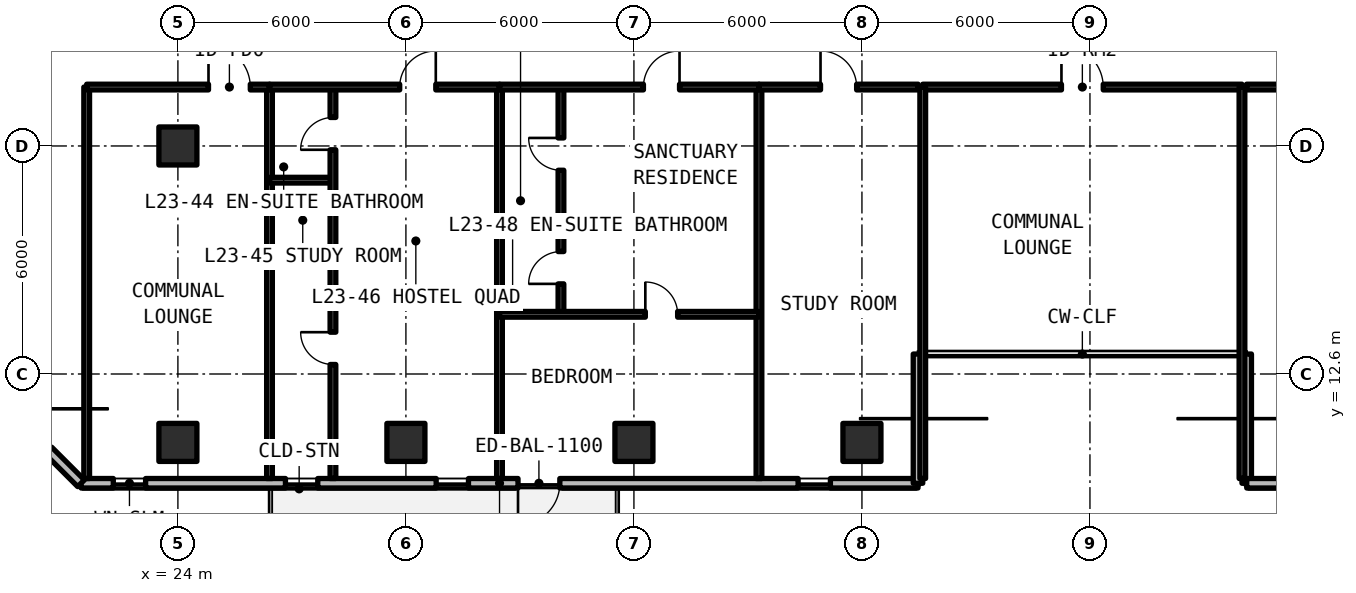
"""IFC4 building model, lengths in metres.
Left out: names, types, materials, properties, quantities, classifications, styles, units other than length and angle.
Written with IfcOpenShell. Run it as: python <this file> out.ifc"""

import sys

from ifc_helpers import new_model, si_unit, direction, frame, frame_2d, origin, origin_2d, place, context, subcontext, project, spatial, rectangle, extrude, element, fill, save


model = new_model("IFC4")
c1 = context("Model", 3, precision=1e-05, world=origin(), true_north=direction((0.0, 1.0)))
c2 = subcontext(c1, "Body", "Model", "MODEL_VIEW")
j1 = project(units=[si_unit("LENGTHUNIT", "METRE"), si_unit("PLANEANGLEUNIT", "RADIAN")], contexts=[c1])
p1 = place(None, origin())
s1 = spatial("IfcSite", under=j1, at=p1, CompositionType="ELEMENT")
p2 = place(p1, origin())
s2 = spatial("IfcBuilding", under=s1, at=p2, CompositionType="ELEMENT")
p3 = place(p2, frame((0.0, 0.0, 85.47)))
s3 = spatial("IfcBuildingStorey", under=s2, at=p3, CompositionType="ELEMENT", Elevation=85.47)
for number, where, z_axis, x_axis in (
    (1, (24.0, 18.6, 0.0), (0.0, 0.0, 1.0), (1.0, 0.0, 0.0)),
    (2, (24.0, 10.8, 0.0), (0.0, 0.0, 1.0), (1.0, 0.0, 0.0)),
    (3, (30.0, 10.8, 0.0), (0.0, 0.0, 1.0), (1.0, 0.0, 0.0)),
    (4, (36.0, 10.8, 0.0), (0.0, 0.0, 1.0), (1.0, 0.0, 0.0)),
    (5, (42.0, 10.8, 0.0), (0.0, 0.0, 1.0), (1.0, 0.0, 0.0)),
):
    element("IfcColumn", number, at=place(p3, frame(where, z_axis=z_axis, x_axis=x_axis)), inside=s3, PredefinedType="COLUMN", context=c2, shape_type="SweptSolid", body=[
        extrude(rectangle(XDim=1.0, YDim=1.0, at=origin_2d()), origin(), (0.0, 0.0, 1.0), 3.3),
    ])
p4 = place(p3, frame((21.452, 9.725, 0.0), z_axis=(0.0, 0.0, 1.0), x_axis=(1.0, 0.0, 0.0)))
e6 = element("IfcWall", 6, at=p4, inside=s3, PredefinedType="SOLIDWALL", context=c2, shape_type="SweptSolid", body=[
    extrude(rectangle(XDim=22.023, YDim=0.25, at=frame_2d((11.012, 0.0))), origin(), (0.0, 0.0, 1.0), 3.08),
])
p5 = place(p4, frame((11.498, 0.0, 0.0)))
e7 = element("IfcOpeningElement", 7, at=p5, cuts=e6, PredefinedType="OPENING", context=c2, shape_type="SweptSolid", body=[
    extrude(rectangle(XDim=1.1, YDim=2.15, at=frame_2d((0.55, 1.075))), frame((0.0, 0.135, 0.0), z_axis=(0.0, -1.0, 0.0), x_axis=(1.0, 0.0, 0.0)), (0.0, 0.0, 1.0), 0.27),
])
p6 = place(p4, frame((0.848, 0.0, 0.78)))
e8 = element("IfcOpeningElement", 8, at=p6, cuts=e6, PredefinedType="OPENING", context=c2, shape_type="SweptSolid", body=[
    extrude(rectangle(XDim=0.85, YDim=1.65, at=frame_2d((0.425, 0.825))), frame((0.0, 0.135, 0.0), z_axis=(0.0, -1.0, 0.0), x_axis=(1.0, 0.0, 0.0)), (0.0, 0.0, 1.0), 0.27),
])
p7 = place(p4, frame((5.378, 0.0, 0.78)))
e9 = element("IfcOpeningElement", 9, at=p7, cuts=e6, PredefinedType="OPENING", context=c2, shape_type="SweptSolid", body=[
    extrude(rectangle(XDim=0.85, YDim=1.65, at=frame_2d((0.425, 0.825))), frame((0.0, 0.135, 0.0), z_axis=(0.0, -1.0, 0.0), x_axis=(1.0, 0.0, 0.0)), (0.0, 0.0, 1.0), 0.27),
])
p8 = place(p4, frame((9.344, 0.0, 0.78)))
e10 = element("IfcOpeningElement", 10, at=p8, cuts=e6, PredefinedType="OPENING", context=c2, shape_type="SweptSolid", body=[
    extrude(rectangle(XDim=0.85, YDim=1.65, at=frame_2d((0.425, 0.825))), frame((0.0, 0.135, 0.0), z_axis=(0.0, -1.0, 0.0), x_axis=(1.0, 0.0, 0.0)), (0.0, 0.0, 1.0), 0.27),
])
p9 = place(p4, frame((18.868, 0.0, 0.78)))
e11 = element("IfcOpeningElement", 11, at=p9, cuts=e6, PredefinedType="OPENING", context=c2, shape_type="SweptSolid", body=[
    extrude(rectangle(XDim=0.85, YDim=1.65, at=frame_2d((0.425, 0.825))), frame((0.0, 0.135, 0.0), z_axis=(0.0, -1.0, 0.0), x_axis=(1.0, 0.0, 0.0)), (0.0, 0.0, 1.0), 0.27),
])
for number, where, z_axis, x_axis in (
    (12, (43.475, 9.725, 0.0), (0.0, 0.0, 1.0), (0.0, 1.0, 0.0)),
    (13, (52.125, 13.125, 0.0), (0.0, 0.0, 1.0), (0.0, -1.0, 0.0)),
):
    element("IfcWall", number, at=place(p3, frame(where, z_axis=z_axis, x_axis=x_axis)), inside=s3, PredefinedType="SOLIDWALL", context=c2, shape_type="SweptSolid", body=[
        extrude(rectangle(XDim=3.4, YDim=0.25, at=frame_2d((1.7, 0.0))), origin(), (0.0, 0.0, 1.0), 3.08),
    ])
p10 = place(p3, frame((52.125, 9.725, 0.0), z_axis=(0.0, 0.0, 1.0), x_axis=(1.0, 0.0, 0.0)))
e14 = element("IfcWall", 14, at=p10, inside=s3, PredefinedType="SOLIDWALL", context=c2, shape_type="SweptSolid", body=[
    extrude(rectangle(XDim=44.023, YDim=0.25, at=frame_2d((22.012, 0.0))), origin(), (0.0, 0.0, 1.0), 3.08),
])
p11 = place(p10, frame((10.875, 0.0, 0.0)))
e15 = element("IfcOpeningElement", 15, at=p11, cuts=e14, PredefinedType="OPENING", context=c2, shape_type="SweptSolid", body=[
    extrude(rectangle(XDim=1.1, YDim=2.15, at=frame_2d((0.55, 1.075))), frame((0.0, 0.135, 0.0), z_axis=(0.0, -1.0, 0.0), x_axis=(1.0, 0.0, 0.0)), (0.0, 0.0, 1.0), 0.27),
])
p12 = place(p10, frame((22.975, 0.0, 0.0)))
e16 = element("IfcOpeningElement", 16, at=p12, cuts=e14, PredefinedType="OPENING", context=c2, shape_type="SweptSolid", body=[
    extrude(rectangle(XDim=1.1, YDim=2.15, at=frame_2d((0.55, 1.075))), frame((0.0, 0.135, 0.0), z_axis=(0.0, -1.0, 0.0), x_axis=(1.0, 0.0, 0.0)), (0.0, 0.0, 1.0), 0.27),
])
p13 = place(p10, frame((35.075, 0.0, 0.0)))
e17 = element("IfcOpeningElement", 17, at=p13, cuts=e14, PredefinedType="OPENING", context=c2, shape_type="SweptSolid", body=[
    extrude(rectangle(XDim=1.1, YDim=2.15, at=frame_2d((0.55, 1.075))), frame((0.0, 0.135, 0.0), z_axis=(0.0, -1.0, 0.0), x_axis=(1.0, 0.0, 0.0)), (0.0, 0.0, 1.0), 0.27),
])
p14 = place(p10, frame((2.669, 0.0, 0.78)))
e18 = element("IfcOpeningElement", 18, at=p14, cuts=e14, PredefinedType="OPENING", context=c2, shape_type="SweptSolid", body=[
    extrude(rectangle(XDim=2.0, YDim=1.66, at=frame_2d((1.0, 0.83))), frame((0.0, 0.135, 0.0), z_axis=(0.0, -1.0, 0.0), x_axis=(1.0, 0.0, 0.0)), (0.0, 0.0, 1.0), 0.27),
])
p15 = place(p10, frame((8.314, 0.0, 0.78)))
e19 = element("IfcOpeningElement", 19, at=p15, cuts=e14, PredefinedType="OPENING", context=c2, shape_type="SweptSolid", body=[
    extrude(rectangle(XDim=0.85, YDim=1.65, at=frame_2d((0.425, 0.825))), frame((0.0, 0.135, 0.0), z_axis=(0.0, -1.0, 0.0), x_axis=(1.0, 0.0, 0.0)), (0.0, 0.0, 1.0), 0.27),
])
p16 = place(p10, frame((27.363, 0.0, 0.78)))
e20 = element("IfcOpeningElement", 20, at=p16, cuts=e14, PredefinedType="OPENING", context=c2, shape_type="SweptSolid", body=[
    extrude(rectangle(XDim=2.0, YDim=1.66, at=frame_2d((1.0, 0.83))), frame((0.0, 0.135, 0.0), z_axis=(0.0, -1.0, 0.0), x_axis=(1.0, 0.0, 0.0)), (0.0, 0.0, 1.0), 0.27),
])
p17 = place(p10, frame((40.048, 0.0, 0.78)))
e21 = element("IfcOpeningElement", 21, at=p17, cuts=e14, PredefinedType="OPENING", context=c2, shape_type="SweptSolid", body=[
    extrude(rectangle(XDim=2.0, YDim=1.66, at=frame_2d((1.0, 0.83))), frame((0.0, 0.135, 0.0), z_axis=(0.0, -1.0, 0.0), x_axis=(1.0, 0.0, 0.0)), (0.0, 0.0, 1.0), 0.27),
])
p18 = place(p3, frame((17.325, 13.852, 0.0), z_axis=(0.0, 0.0, 1.0), x_axis=(0.707127696864, -0.70708586489, 0.0)))
e22 = element("IfcWall", 22, at=p18, inside=s3, PredefinedType="SOLIDWALL", context=c2, shape_type="SweptSolid", body=[
    extrude(rectangle(XDim=5.836, YDim=0.25, at=frame_2d((2.918, 0.0))), origin(), (0.0, 0.0, 1.0), 3.08),
])
p19 = place(p18, frame((1.218, 0.0, 0.78)))
e23 = element("IfcOpeningElement", 23, at=p19, cuts=e22, PredefinedType="OPENING", context=c2, shape_type="SweptSolid", body=[
    extrude(rectangle(XDim=3.4, YDim=1.66, at=frame_2d((1.7, 0.83))), frame((0.0, 0.135, 0.0), z_axis=(0.0, -1.0, 0.0), x_axis=(1.0, 0.0, 0.0)), (0.0, 0.0, 1.0), 0.27),
])
p20 = place(p3, frame((43.6, 20.15, 0.0), z_axis=(0.0, 0.0, 1.0), x_axis=(1.0, 0.0, 0.0)))
e24 = element("IfcWall", 24, at=p20, inside=s3, PredefinedType="SOLIDWALL", context=c2, shape_type="SweptSolid", body=[
    extrude(rectangle(XDim=8.4, YDim=0.15, at=frame_2d((4.2, 0.0))), origin(), (0.0, 0.0, 1.0), 2.35),
])
p21 = place(p20, frame((3.65, 0.0, 0.0)))
e25 = element("IfcOpeningElement", 25, at=p21, cuts=e24, PredefinedType="OPENING", context=c2, shape_type="SweptSolid", body=[
    extrude(rectangle(XDim=1.1, YDim=2.15, at=frame_2d((0.55, 1.075))), frame((0.0, 0.085, 0.0), z_axis=(0.0, -1.0, 0.0), x_axis=(1.0, 0.0, 0.0)), (0.0, 0.0, 1.0), 0.17),
])
for number, where, z_axis, x_axis in (
    (26, (43.6, 9.85, 0.0), (0.0, 0.0, 1.0), (0.0, 1.0, 0.0)),
    (27, (52.0, 9.85, 0.0), (0.0, 0.0, 1.0), (0.0, 1.0, 0.0)),
    (28, (21.6, 9.85, 0.0), (0.0, 0.0, 1.0), (0.0, 1.0, 0.0)),
    (29, (26.41, 9.85, 0.0), (0.0, 0.0, 1.0), (0.0, 1.0, 0.0)),
):
    element("IfcWall", number, at=place(p3, frame(where, z_axis=z_axis, x_axis=x_axis)), inside=s3, PredefinedType="SOLIDWALL", context=c2, shape_type="SweptSolid", body=[
        extrude(rectangle(XDim=10.3, YDim=0.15, at=frame_2d((5.15, 0.0))), origin(), (0.0, 0.0, 1.0), 2.35),
    ])
p22 = place(p3, frame((21.6, 20.15, 0.0), z_axis=(0.0, 0.0, 1.0), x_axis=(1.0, 0.0, 0.0)))
e30 = element("IfcWall", 30, at=p22, inside=s3, PredefinedType="SOLIDWALL", context=c2, shape_type="SweptSolid", body=[
    extrude(rectangle(XDim=4.81, YDim=0.15, at=frame_2d((2.405, 0.0))), origin(), (0.0, 0.0, 1.0), 2.35),
])
p23 = place(p22, frame((3.205, 0.0, 0.0)))
e31 = element("IfcOpeningElement", 31, at=p23, cuts=e30, PredefinedType="OPENING", context=c2, shape_type="SweptSolid", body=[
    extrude(rectangle(XDim=1.1, YDim=2.15, at=frame_2d((0.55, 1.075))), frame((0.0, 0.085, 0.0), z_axis=(0.0, -1.0, 0.0), x_axis=(1.0, 0.0, 0.0)), (0.0, 0.0, 1.0), 0.17),
])
p24 = place(p3, frame((32.462, 9.85, 0.0), z_axis=(0.0, 0.0, 1.0), x_axis=(0.0, 1.0, 0.0)))
e32 = element("IfcWall", 32, at=p24, inside=s3, PredefinedType="SOLIDWALL", context=c2, shape_type="SweptSolid", body=[
    extrude(rectangle(XDim=10.3, YDim=0.15, at=frame_2d((5.15, 0.0))), origin(), (0.0, 0.0, 1.0), 2.35),
])
p25 = place(p3, frame((26.41, 17.7, 0.0), z_axis=(0.0, 0.0, 1.0), x_axis=(1.0, 0.0, 0.0)))
e33 = element("IfcWall", 33, at=p25, inside=s3, PredefinedType="PARTITIONING", context=c2, shape_type="SweptSolid", body=[
    extrude(rectangle(XDim=1.67, YDim=0.15, at=frame_2d((0.835, 0.0))), origin(), (0.0, 0.0, 1.0), 2.35),
])
p26 = place(p3, frame((28.08, 9.85, 0.0), z_axis=(0.0, 0.0, 1.0), x_axis=(0.0, 1.0, 0.0)))
e34 = element("IfcWall", 34, at=p26, inside=s3, PredefinedType="PARTITIONING", context=c2, shape_type="SweptSolid", body=[
    extrude(rectangle(XDim=10.3, YDim=0.15, at=frame_2d((5.15, 0.0))), origin(), (0.0, 0.0, 1.0), 2.35),
])
p27 = place(p26, frame((3.0, 0.0, 0.0)))
e35 = element("IfcOpeningElement", 35, at=p27, cuts=e34, PredefinedType="OPENING", context=c2, shape_type="SweptSolid", body=[
    extrude(rectangle(XDim=0.85, YDim=2.1, at=frame_2d((0.425, 1.05))), frame((0.0, 0.085, 0.0), z_axis=(0.0, -1.0, 0.0), x_axis=(1.0, 0.0, 0.0)), (0.0, 0.0, 1.0), 0.17),
])
p28 = place(p26, frame((8.65, 0.0, 0.0)))
e36 = element("IfcOpeningElement", 36, at=p28, cuts=e34, PredefinedType="OPENING", context=c2, shape_type="SweptSolid", body=[
    extrude(rectangle(XDim=0.85, YDim=2.1, at=frame_2d((0.425, 1.05))), frame((0.0, 0.085, 0.0), z_axis=(0.0, -1.0, 0.0), x_axis=(1.0, 0.0, 0.0)), (0.0, 0.0, 1.0), 0.17),
])
p29 = place(p3, frame((26.41, 20.15, 0.0), z_axis=(0.0, 0.0, 1.0), x_axis=(1.0, 0.0, 0.0)))
e37 = element("IfcWall", 37, at=p29, inside=s3, PredefinedType="SOLIDWALL", context=c2, shape_type="SweptSolid", body=[
    extrude(rectangle(XDim=6.052, YDim=0.15, at=frame_2d((3.026, 0.0))), origin(), (0.0, 0.0, 1.0), 2.35),
])
p30 = place(p29, frame((3.426, 0.0, 0.0)))
e38 = element("IfcOpeningElement", 38, at=p30, cuts=e37, PredefinedType="OPENING", context=c2, shape_type="SweptSolid", body=[
    extrude(rectangle(XDim=0.95, YDim=2.15, at=frame_2d((0.475, 1.075))), frame((0.0, 0.085, 0.0), z_axis=(0.0, -1.0, 0.0), x_axis=(1.0, 0.0, 0.0)), (0.0, 0.0, 1.0), 0.17),
])
p31 = place(p3, frame((39.29, 9.85, 0.0), z_axis=(0.0, 0.0, 1.0), x_axis=(0.0, 1.0, 0.0)))
e39 = element("IfcWall", 39, at=p31, inside=s3, PredefinedType="SOLIDWALL", context=c2, shape_type="SweptSolid", body=[
    extrude(rectangle(XDim=10.3, YDim=0.15, at=frame_2d((5.15, 0.0))), origin(), (0.0, 0.0, 1.0), 2.35),
])
p32 = place(p3, frame((32.462, 16.622, 0.0), z_axis=(0.0, 0.0, 1.0), x_axis=(1.0, 0.0, 0.0)))
e40 = element("IfcWall", 40, at=p32, inside=s3, PredefinedType="PARTITIONING", context=c2, shape_type="SweptSolid", body=[
    extrude(rectangle(XDim=1.618, YDim=0.15, at=frame_2d((0.809, 0.0))), origin(), (0.0, 0.0, 1.0), 2.35),
])
p33 = place(p3, frame((34.08, 14.171, 0.0), z_axis=(0.0, 0.0, 1.0), x_axis=(0.0, 1.0, 0.0)))
e41 = element("IfcWall", 41, at=p33, inside=s3, PredefinedType="PARTITIONING", context=c2, shape_type="SweptSolid", body=[
    extrude(rectangle(XDim=5.979, YDim=0.15, at=frame_2d((2.99, 0.0))), origin(), (0.0, 0.0, 1.0), 2.35),
])
p34 = place(p33, frame((0.801, 0.0, 0.0)))
e42 = element("IfcOpeningElement", 42, at=p34, cuts=e41, PredefinedType="OPENING", context=c2, shape_type="SweptSolid", body=[
    extrude(rectangle(XDim=0.85, YDim=2.1, at=frame_2d((0.425, 1.05))), frame((0.0, 0.085, 0.0), z_axis=(0.0, -1.0, 0.0), x_axis=(1.0, 0.0, 0.0)), (0.0, 0.0, 1.0), 0.17),
])
p35 = place(p33, frame((3.791, 0.0, 0.0)))
e43 = element("IfcOpeningElement", 43, at=p35, cuts=e41, PredefinedType="OPENING", context=c2, shape_type="SweptSolid", body=[
    extrude(rectangle(XDim=0.85, YDim=2.1, at=frame_2d((0.425, 1.05))), frame((0.0, 0.085, 0.0), z_axis=(0.0, -1.0, 0.0), x_axis=(1.0, 0.0, 0.0)), (0.0, 0.0, 1.0), 0.17),
])
p36 = place(p3, frame((32.462, 14.171, 0.0), z_axis=(0.0, 0.0, 1.0), x_axis=(1.0, 0.0, 0.0)))
e44 = element("IfcWall", 44, at=p36, inside=s3, PredefinedType="PARTITIONING", context=c2, shape_type="SweptSolid", body=[
    extrude(rectangle(XDim=6.828, YDim=0.15, at=frame_2d((3.414, 0.0))), origin(), (0.0, 0.0, 1.0), 2.35),
])
p37 = place(p36, frame((3.838, 0.0, 0.0)))
e45 = element("IfcOpeningElement", 45, at=p37, cuts=e44, PredefinedType="OPENING", context=c2, shape_type="SweptSolid", body=[
    extrude(rectangle(XDim=0.85, YDim=2.1, at=frame_2d((0.425, 1.05))), frame((0.0, 0.085, 0.0), z_axis=(0.0, -1.0, 0.0), x_axis=(1.0, 0.0, 0.0)), (0.0, 0.0, 1.0), 0.17),
])
p38 = place(p3, frame((32.462, 20.15, 0.0), z_axis=(0.0, 0.0, 1.0), x_axis=(1.0, 0.0, 0.0)))
e46 = element("IfcWall", 46, at=p38, inside=s3, PredefinedType="SOLIDWALL", context=c2, shape_type="SweptSolid", body=[
    extrude(rectangle(XDim=6.828, YDim=0.15, at=frame_2d((3.414, 0.0))), origin(), (0.0, 0.0, 1.0), 2.35),
])
p39 = place(p38, frame((3.788, 0.0, 0.0)))
e47 = element("IfcOpeningElement", 47, at=p39, cuts=e46, PredefinedType="OPENING", context=c2, shape_type="SweptSolid", body=[
    extrude(rectangle(XDim=0.95, YDim=2.15, at=frame_2d((0.475, 1.075))), frame((0.0, 0.085, 0.0), z_axis=(0.0, -1.0, 0.0), x_axis=(1.0, 0.0, 0.0)), (0.0, 0.0, 1.0), 0.17),
])
p40 = place(p3, frame((39.29, 20.15, 0.0), z_axis=(0.0, 0.0, 1.0), x_axis=(1.0, 0.0, 0.0)))
e48 = element("IfcWall", 48, at=p40, inside=s3, PredefinedType="SOLIDWALL", context=c2, shape_type="SweptSolid", body=[
    extrude(rectangle(XDim=4.19, YDim=0.15, at=frame_2d((2.095, 0.0))), origin(), (0.0, 0.0, 1.0), 2.35),
])
p41 = place(p40, frame((1.62, 0.0, 0.0)))
e49 = element("IfcOpeningElement", 49, at=p41, cuts=e48, PredefinedType="OPENING", context=c2, shape_type="SweptSolid", body=[
    extrude(rectangle(XDim=0.95, YDim=2.15, at=frame_2d((0.475, 1.075))), frame((0.0, 0.085, 0.0), z_axis=(0.0, -1.0, 0.0), x_axis=(1.0, 0.0, 0.0)), (0.0, 0.0, 1.0), 0.17),
])
p42 = place(p3, frame((52.12, 20.15, 0.0), z_axis=(0.0, 0.0, 1.0), x_axis=(1.0, 0.0, 0.0)))
e50 = element("IfcWall", 50, at=p42, inside=s3, PredefinedType="SOLIDWALL", context=c2, shape_type="SweptSolid", body=[
    extrude(rectangle(XDim=6.708, YDim=0.15, at=frame_2d((3.354, 0.0))), origin(), (0.0, 0.0, 1.0), 2.35),
])
p43 = place(p42, frame((2.879, 0.0, 0.0)))
e51 = element("IfcOpeningElement", 51, at=p43, cuts=e50, PredefinedType="OPENING", context=c2, shape_type="SweptSolid", body=[
    extrude(rectangle(XDim=0.95, YDim=2.15, at=frame_2d((0.475, 1.075))), frame((0.0, 0.085, 0.0), z_axis=(0.0, -1.0, 0.0), x_axis=(1.0, 0.0, 0.0)), (0.0, 0.0, 1.0), 0.17),
])
p44 = place(p5, frame((1.1, 0.0, 0.0), z_axis=(0.0, 0.0, 1.0), x_axis=(-1.0, 0.0, 0.0)))
e52 = element("IfcDoor", 52, at=p44, inside=s3, OperationType="SINGLE_SWING_RIGHT", PredefinedType="DOOR", context=c2, shape_type="SweptSolid", body=[
    extrude(rectangle(XDim=1.1, YDim=2.15, at=frame_2d((0.55, 1.075))), frame((0.0, 0.025, 0.0), z_axis=(0.0, -1.0, 0.0), x_axis=(1.0, 0.0, 0.0)), (0.0, 0.0, 1.0), 0.05),
])
fill(e7, e52)
p45 = place(p6, origin())
e53 = element("IfcWindow", 53, at=p45, inside=s3, PartitioningType="SINGLE_PANEL", PredefinedType="WINDOW", context=c2, shape_type="SweptSolid", body=[
    extrude(rectangle(XDim=0.85, YDim=1.65, at=frame_2d((0.425, 0.825))), frame((0.0, 0.03, 0.0), z_axis=(0.0, -1.0, 0.0), x_axis=(1.0, 0.0, 0.0)), (0.0, 0.0, 1.0), 0.06),
])
fill(e8, e53)
p46 = place(p7, origin())
e54 = element("IfcWindow", 54, at=p46, inside=s3, PartitioningType="SINGLE_PANEL", PredefinedType="WINDOW", context=c2, shape_type="SweptSolid", body=[
    extrude(rectangle(XDim=0.85, YDim=1.65, at=frame_2d((0.425, 0.825))), frame((0.0, 0.03, 0.0), z_axis=(0.0, -1.0, 0.0), x_axis=(1.0, 0.0, 0.0)), (0.0, 0.0, 1.0), 0.06),
])
fill(e9, e54)
p47 = place(p8, origin())
e55 = element("IfcWindow", 55, at=p47, inside=s3, PartitioningType="SINGLE_PANEL", PredefinedType="WINDOW", context=c2, shape_type="SweptSolid", body=[
    extrude(rectangle(XDim=0.85, YDim=1.65, at=frame_2d((0.425, 0.825))), frame((0.0, 0.03, 0.0), z_axis=(0.0, -1.0, 0.0), x_axis=(1.0, 0.0, 0.0)), (0.0, 0.0, 1.0), 0.06),
])
fill(e10, e55)
p48 = place(p9, origin())
e56 = element("IfcWindow", 56, at=p48, inside=s3, PartitioningType="SINGLE_PANEL", PredefinedType="WINDOW", context=c2, shape_type="SweptSolid", body=[
    extrude(rectangle(XDim=0.85, YDim=1.65, at=frame_2d((0.425, 0.825))), frame((0.0, 0.03, 0.0), z_axis=(0.0, -1.0, 0.0), x_axis=(1.0, 0.0, 0.0)), (0.0, 0.0, 1.0), 0.06),
])
fill(e11, e56)
p49 = place(p21, origin())
e57 = element("IfcDoor", 57, at=p49, inside=s3, OperationType="SINGLE_SWING_LEFT", PredefinedType="DOOR", context=c2, shape_type="SweptSolid", body=[
    extrude(rectangle(XDim=1.1, YDim=2.15, at=frame_2d((0.55, 1.075))), frame((0.0, 0.025, 0.0), z_axis=(0.0, -1.0, 0.0), x_axis=(1.0, 0.0, 0.0)), (0.0, 0.0, 1.0), 0.05),
])
fill(e25, e57)
p50 = place(p23, origin())
e58 = element("IfcDoor", 58, at=p50, inside=s3, OperationType="SINGLE_SWING_LEFT", PredefinedType="DOOR", context=c2, shape_type="SweptSolid", body=[
    extrude(rectangle(XDim=1.1, YDim=2.15, at=frame_2d((0.55, 1.075))), frame((0.0, 0.025, 0.0), z_axis=(0.0, -1.0, 0.0), x_axis=(1.0, 0.0, 0.0)), (0.0, 0.0, 1.0), 0.05),
])
fill(e31, e58)
p51 = place(p27, origin())
e59 = element("IfcDoor", 59, at=p51, inside=s3, OperationType="SINGLE_SWING_RIGHT", PredefinedType="DOOR", context=c2, shape_type="SweptSolid", body=[
    extrude(rectangle(XDim=0.85, YDim=2.1, at=frame_2d((0.425, 1.05))), frame((0.0, 0.025, 0.0), z_axis=(0.0, -1.0, 0.0), x_axis=(1.0, 0.0, 0.0)), (0.0, 0.0, 1.0), 0.05),
])
fill(e35, e59)
p52 = place(p28, origin())
e60 = element("IfcDoor", 60, at=p52, inside=s3, OperationType="SINGLE_SWING_LEFT", PredefinedType="DOOR", context=c2, shape_type="SweptSolid", body=[
    extrude(rectangle(XDim=0.85, YDim=2.1, at=frame_2d((0.425, 1.05))), frame((0.0, 0.025, 0.0), z_axis=(0.0, -1.0, 0.0), x_axis=(1.0, 0.0, 0.0)), (0.0, 0.0, 1.0), 0.05),
])
fill(e36, e60)
p53 = place(p30, origin())
e61 = element("IfcDoor", 61, at=p53, inside=s3, OperationType="SINGLE_SWING_RIGHT", PredefinedType="DOOR", context=c2, shape_type="SweptSolid", body=[
    extrude(rectangle(XDim=0.95, YDim=2.15, at=frame_2d((0.475, 1.075))), frame((0.0, 0.025, 0.0), z_axis=(0.0, -1.0, 0.0), x_axis=(1.0, 0.0, 0.0)), (0.0, 0.0, 1.0), 0.05),
])
fill(e38, e61)
p54 = place(p34, origin())
e62 = element("IfcDoor", 62, at=p54, inside=s3, OperationType="SINGLE_SWING_LEFT", PredefinedType="DOOR", context=c2, shape_type="SweptSolid", body=[
    extrude(rectangle(XDim=0.85, YDim=2.1, at=frame_2d((0.425, 1.05))), frame((0.0, 0.025, 0.0), z_axis=(0.0, -1.0, 0.0), x_axis=(1.0, 0.0, 0.0)), (0.0, 0.0, 1.0), 0.05),
])
fill(e42, e62)
p55 = place(p35, origin())
e63 = element("IfcDoor", 63, at=p55, inside=s3, OperationType="SINGLE_SWING_RIGHT", PredefinedType="DOOR", context=c2, shape_type="SweptSolid", body=[
    extrude(rectangle(XDim=0.85, YDim=2.1, at=frame_2d((0.425, 1.05))), frame((0.0, 0.025, 0.0), z_axis=(0.0, -1.0, 0.0), x_axis=(1.0, 0.0, 0.0)), (0.0, 0.0, 1.0), 0.05),
])
fill(e43, e63)
p56 = place(p37, origin())
e64 = element("IfcDoor", 64, at=p56, inside=s3, OperationType="SINGLE_SWING_LEFT", PredefinedType="DOOR", context=c2, shape_type="SweptSolid", body=[
    extrude(rectangle(XDim=0.85, YDim=2.1, at=frame_2d((0.425, 1.05))), frame((0.0, 0.025, 0.0), z_axis=(0.0, -1.0, 0.0), x_axis=(1.0, 0.0, 0.0)), (0.0, 0.0, 1.0), 0.05),
])
fill(e45, e64)
p57 = place(p39, origin())
e65 = element("IfcDoor", 65, at=p57, inside=s3, OperationType="SINGLE_SWING_RIGHT", PredefinedType="DOOR", context=c2, shape_type="SweptSolid", body=[
    extrude(rectangle(XDim=0.95, YDim=2.15, at=frame_2d((0.475, 1.075))), frame((0.0, 0.025, 0.0), z_axis=(0.0, -1.0, 0.0), x_axis=(1.0, 0.0, 0.0)), (0.0, 0.0, 1.0), 0.05),
])
fill(e47, e65)
p58 = place(p41, origin())
e66 = element("IfcDoor", 66, at=p58, inside=s3, OperationType="SINGLE_SWING_LEFT", PredefinedType="DOOR", context=c2, shape_type="SweptSolid", body=[
    extrude(rectangle(XDim=0.95, YDim=2.15, at=frame_2d((0.475, 1.075))), frame((0.0, 0.025, 0.0), z_axis=(0.0, -1.0, 0.0), x_axis=(1.0, 0.0, 0.0)), (0.0, 0.0, 1.0), 0.05),
])
fill(e49, e66)
save(model, sys.argv[1])
